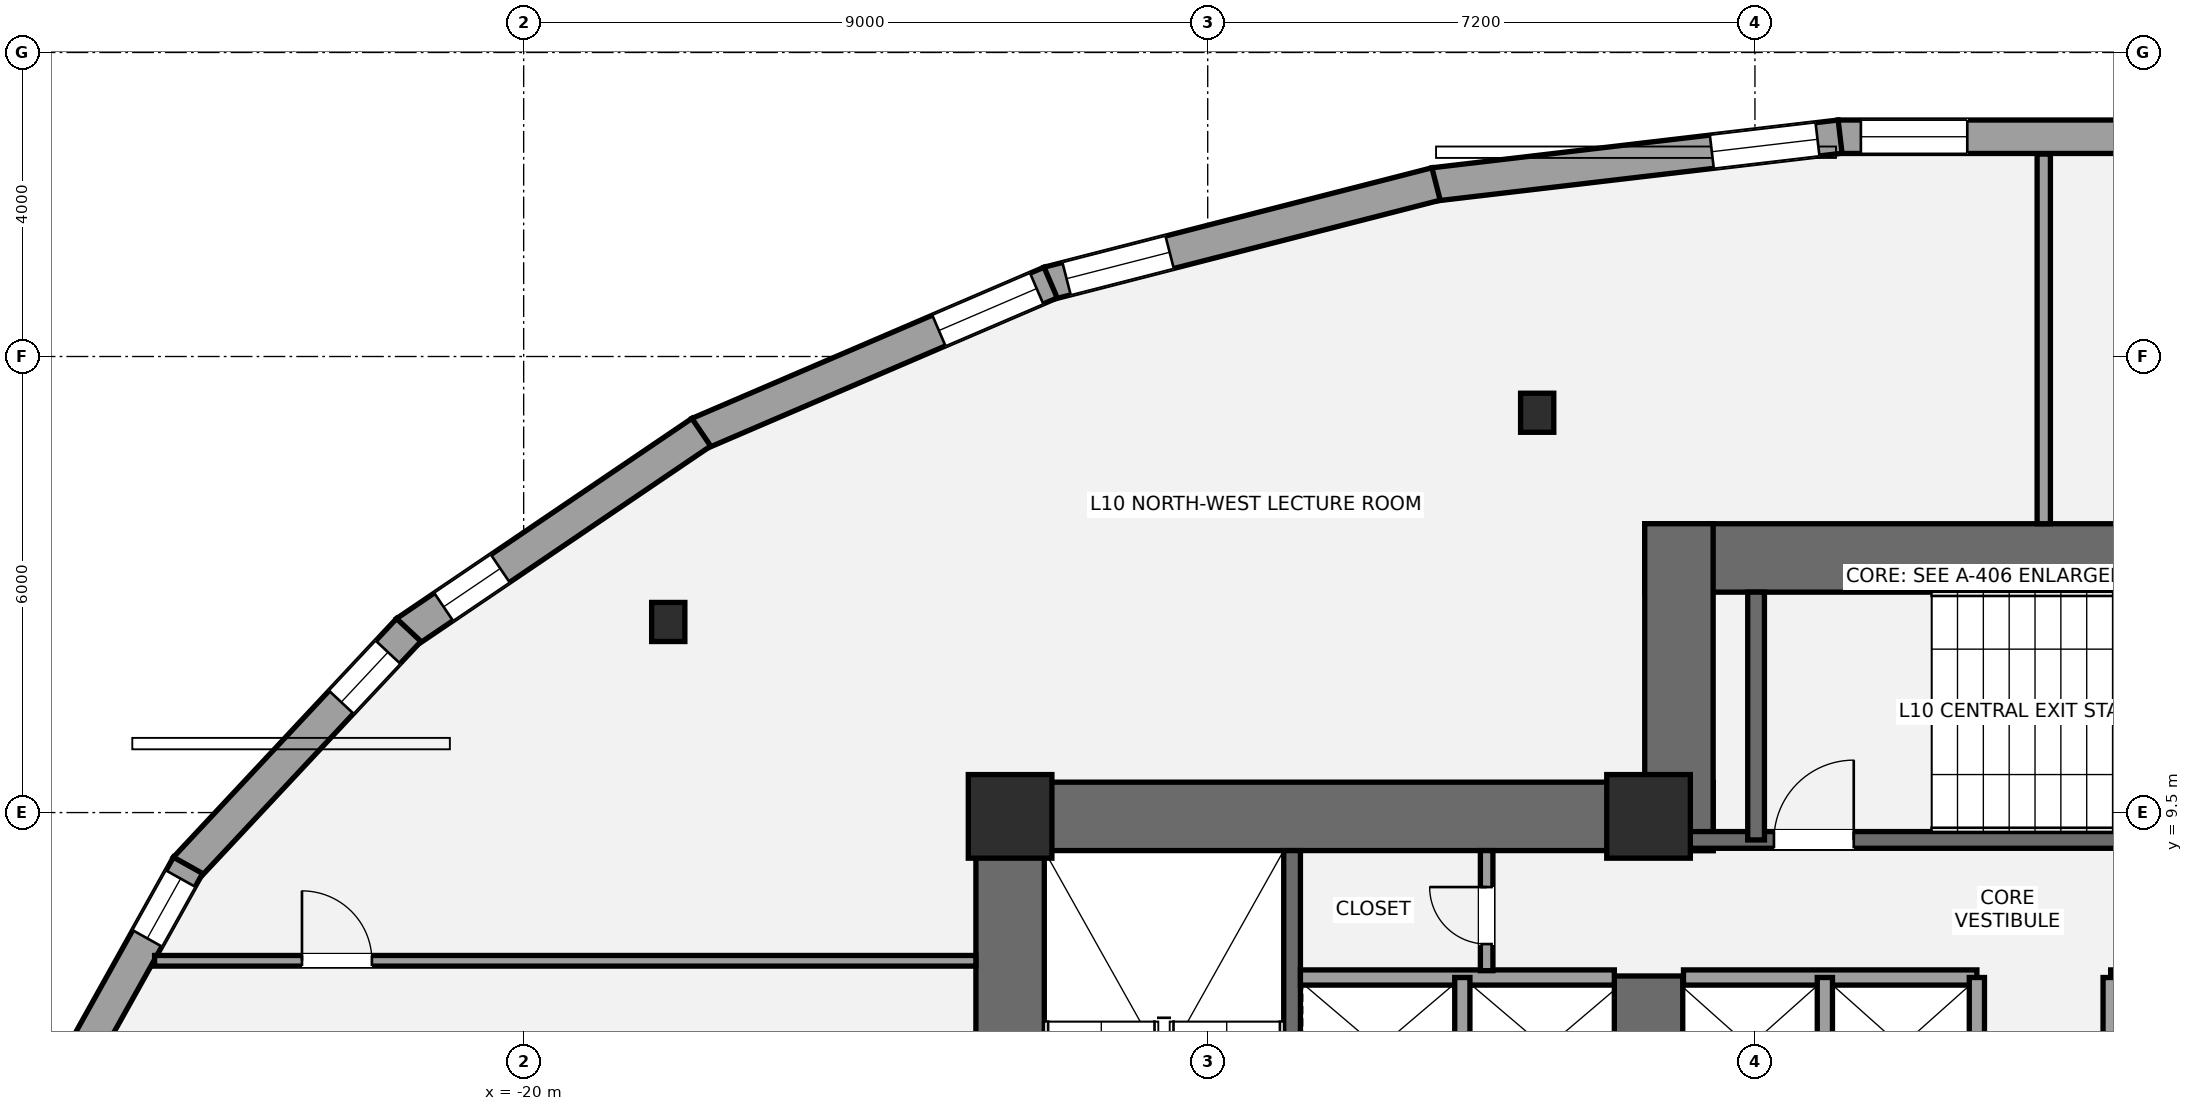
"""IFC4 building model, lengths in metres.
Left out: names, types, materials, properties, quantities, classifications, styles, units other than length and angle.
Written with IfcOpenShell. Run it as: python <this file> out.ifc"""

import sys

from ifc_helpers import new_model, si_unit, direction, frame, frame_2d, origin, origin_2d, place, context, subcontext, project, spatial, rectangle, i_section, extrude, element, fill, save


model = new_model("IFC4")
c1 = context("Model", 3, precision=1e-05, world=origin(), true_north=direction((0.0, 1.0)))
c2 = subcontext(c1, "Body", "Model", "MODEL_VIEW")
j1 = project(units=[si_unit("LENGTHUNIT", "METRE"), si_unit("PLANEANGLEUNIT", "RADIAN")], contexts=[c1])
p1 = place(None, origin())
s1 = spatial("IfcSite", under=j1, at=p1, CompositionType="ELEMENT")
p2 = place(p1, origin())
s2 = spatial("IfcBuilding", under=s1, at=p2, CompositionType="ELEMENT")
p3 = place(p2, frame((0.0, 0.0, 41.4)))
s3 = spatial("IfcBuildingStorey", under=s2, at=p3, CompositionType="ELEMENT", Elevation=41.4)
p4 = place(p3, frame((-13.6, 0.95, 0.0), z_axis=(0.0, 0.0, 1.0), x_axis=(0.0, 1.0, 0.0)))
e1 = element("IfcWall", 1, at=p4, inside=s3, PredefinedType="SHEAR", context=c2, shape_type="SweptSolid", body=[
    extrude(rectangle(XDim=8.95, YDim=0.9, at=frame_2d((4.475, 0.0))), origin(), (0.0, 0.0, 1.0), 3.6),
])
p5 = place(p3, frame((-14.05, 9.45, 0.0), z_axis=(0.0, 0.0, 1.0), x_axis=(1.0, 0.0, 0.0)))
e2 = element("IfcWall", 2, at=p5, inside=s3, PredefinedType="SHEAR", context=c2, shape_type="SweptSolid", body=[
    extrude(rectangle(XDim=9.7, YDim=0.9, at=frame_2d((4.85, 0.0))), origin(), (0.0, 0.0, 1.0), 3.6),
])
p6 = place(p3, frame((-5.2, 5.35, 0.0), z_axis=(0.0, 0.0, 1.0), x_axis=(0.0, 1.0, 0.0)))
e3 = element("IfcWall", 3, at=p6, inside=s3, PredefinedType="SHEAR", context=c2, shape_type="SweptSolid", body=[
    extrude(rectangle(XDim=2.0, YDim=0.9, at=frame_2d((1.0, 0.0))), origin(), (0.0, 0.0, 1.0), 3.6),
])
p7 = place(p3, frame((-9.89, 1.85, 0.0), z_axis=(0.0, 0.0, 1.0), x_axis=(0.0, 1.0, 0.0)))
e4 = element("IfcWall", 4, at=p7, inside=s3, PredefinedType="SHEAR", context=c2, shape_type="SweptSolid", body=[
    extrude(rectangle(XDim=7.15, YDim=0.22, at=frame_2d((3.575, 0.0))), origin(), (0.0, 0.0, 1.0), 3.6),
])
p8 = place(p3, frame((-5.25, 12.85, 0.0), z_axis=(0.0, 0.0, 1.0), x_axis=(1.0, 0.0, 0.0)))
e5 = element("IfcWall", 5, at=p8, inside=s3, PredefinedType="SHEAR", context=c2, shape_type="SweptSolid", body=[
    extrude(rectangle(XDim=10.5, YDim=0.9, at=frame_2d((5.25, 0.0))), origin(), (0.0, 0.0, 1.0), 3.6),
])
p9 = place(p3, frame((-4.8, 9.0, 0.0), z_axis=(0.0, 0.0, 1.0), x_axis=(0.0, 1.0, 0.0)))
e6 = element("IfcWall", 6, at=p9, inside=s3, PredefinedType="SHEAR", context=c2, shape_type="SweptSolid", body=[
    extrude(rectangle(XDim=4.3, YDim=0.9, at=frame_2d((2.15, 0.0))), origin(), (0.0, 0.0, 1.0), 3.6),
])
p10 = place(p3, frame((-4.7, 9.14, 0.0), z_axis=(0.0, 0.0, 1.0), x_axis=(1.0, 0.0, 0.0)))
e7 = element("IfcWall", 7, at=p10, inside=s3, PredefinedType="SHEAR", context=c2, shape_type="SweptSolid", body=[
    extrude(rectangle(XDim=9.3, YDim=0.22, at=frame_2d((4.65, 0.0))), origin(), (0.0, 0.0, 1.0), 3.6),
])
p11 = place(p10, frame((1.15, 0.0, 0.0)))
e8 = element("IfcOpeningElement", 8, at=p11, cuts=e7, PredefinedType="OPENING", context=c2, shape_type="SweptSolid", body=[
    extrude(rectangle(XDim=1.05, YDim=2.15, at=frame_2d((0.525, 1.075))), frame((0.0, 0.12, 0.0), z_axis=(0.0, -1.0, 0.0), x_axis=(1.0, 0.0, 0.0)), (0.0, 0.0, 1.0), 0.24),
])
p12 = place(p3, frame((-3.785, 9.14, 0.0), z_axis=(0.0, 0.0, 1.0), x_axis=(0.0, 1.0, 0.0)))
e9 = element("IfcWall", 9, at=p12, inside=s3, PredefinedType="SHEAR", context=c2, shape_type="SweptSolid", body=[
    extrude(rectangle(XDim=3.26, YDim=0.22, at=frame_2d((1.63, 0.0))), origin(), (0.0, 0.0, 1.0), 3.6),
])
for number, where, z_axis, x_axis in (
    (10, (-13.6, 9.45, 0.0), (0.0, 0.0, 1.0), (1.0, 0.0, 0.0)),
    (11, (-5.2, 9.45, 0.0), (0.0, 0.0, 1.0), (1.0, 0.0, 0.0)),
):
    element("IfcColumn", number, at=place(p3, frame(where, z_axis=z_axis, x_axis=x_axis)), inside=s3, PredefinedType="COLUMN", context=c2, shape_type="SweptSolid", body=[
        extrude(rectangle(XDim=1.1, YDim=1.1, at=origin_2d()), origin(), (0.0, 0.0, 1.0), 3.6),
    ])
for number, where, z_axis, x_axis in (
    (12, (-6.665, 14.76, 0.0), (0.0, 0.0, 1.0), (1.0, 0.0, 0.0)),
    (13, (-18.098, 12.007, 0.0), (0.0, 0.0, 1.0), (1.0, 0.0, 0.0)),
):
    element("IfcColumn", number, at=place(p3, frame(where, z_axis=z_axis, x_axis=x_axis)), inside=s3, PredefinedType="COLUMN", context=c2, shape_type="SweptSolid", body=[
        extrude(i_section(OverallWidth=0.437, OverallDepth=0.514, WebThickness=0.061, FlangeThickness=0.097, at=origin_2d()), origin(), (0.0, 0.0, 1.0), 3.6),
    ])
p13 = place(p3, frame((-2.705, 18.391, 0.0), z_axis=(0.0, 0.0, 1.0), x_axis=(1.0, 0.0, 0.0)))
e14 = element("IfcWall", 14, at=p13, inside=s3, PredefinedType="STANDARD", context=c2, shape_type="SweptSolid", body=[
    extrude(rectangle(XDim=5.41, YDim=0.44, at=frame_2d((2.705, 0.0))), origin(), (0.0, 0.0, 1.0), 2.529),
])
p14 = place(p13, frame((0.299, 0.0, 0.58)))
e15 = element("IfcOpeningElement", 15, at=p14, cuts=e14, PredefinedType="OPENING", context=c2, shape_type="SweptSolid", body=[
    extrude(rectangle(XDim=1.4, YDim=1.55, at=frame_2d((0.7, 0.775))), frame((0.0, 0.23, 0.0), z_axis=(0.0, -1.0, 0.0), x_axis=(1.0, 0.0, 0.0)), (0.0, 0.0, 1.0), 0.46),
])
p15 = place(p3, frame((-8.025, 17.764, 0.0), z_axis=(0.0, 0.0, 1.0), x_axis=(0.993159890371, 0.116762289112, 0.0)))
e16 = element("IfcWall", 16, at=p15, inside=s3, PredefinedType="STANDARD", context=c2, shape_type="SweptSolid", body=[
    extrude(rectangle(XDim=5.382, YDim=0.44, at=frame_2d((2.691, 0.0))), origin(), (0.0, 0.0, 1.0), 2.529),
])
p16 = place(p15, frame((3.682, 0.0, 0.58)))
e17 = element("IfcOpeningElement", 17, at=p16, cuts=e16, PredefinedType="OPENING", context=c2, shape_type="SweptSolid", body=[
    extrude(rectangle(XDim=1.4, YDim=1.55, at=frame_2d((0.7, 0.775))), frame((0.0, 0.23, 0.0), z_axis=(0.0, -1.0, 0.0), x_axis=(1.0, 0.0, 0.0)), (0.0, 0.0, 1.0), 0.46),
])
p17 = place(p3, frame((-13.099, 16.462, 0.0), z_axis=(0.0, 0.0, 1.0), x_axis=(0.968705592422, 0.248212560542, 0.0)))
e18 = element("IfcWall", 18, at=p17, inside=s3, PredefinedType="STANDARD", context=c2, shape_type="SweptSolid", body=[
    extrude(rectangle(XDim=5.268, YDim=0.44, at=frame_2d((2.634, 0.0))), origin(), (0.0, 0.0, 1.0), 2.529),
])
p18 = place(p17, frame((0.25, 0.0, 0.58)))
e19 = element("IfcOpeningElement", 19, at=p18, cuts=e18, PredefinedType="OPENING", context=c2, shape_type="SweptSolid", body=[
    extrude(rectangle(XDim=1.4, YDim=1.55, at=frame_2d((0.7, 0.775))), frame((0.0, 0.23, 0.0), z_axis=(0.0, -1.0, 0.0), x_axis=(1.0, 0.0, 0.0)), (0.0, 0.0, 1.0), 0.46),
])
p19 = place(p3, frame((-17.7, 14.483, 0.0), z_axis=(0.0, 0.0, 1.0), x_axis=(0.918881850071, 0.394532819433, 0.0)))
e20 = element("IfcWall", 20, at=p19, inside=s3, PredefinedType="STANDARD", context=c2, shape_type="SweptSolid", body=[
    extrude(rectangle(XDim=5.042, YDim=0.44, at=frame_2d((2.521, 0.0))), origin(), (0.0, 0.0, 1.0), 2.529),
])
p20 = place(p19, frame((3.442, 0.0, 0.45)))
e21 = element("IfcOpeningElement", 21, at=p20, cuts=e20, PredefinedType="OPENING", context=c2, shape_type="SweptSolid", body=[
    extrude(rectangle(XDim=1.4, YDim=1.55, at=frame_2d((0.7, 0.775))), frame((0.0, 0.23, 0.0), z_axis=(0.0, -1.0, 0.0), x_axis=(1.0, 0.0, 0.0)), (0.0, 0.0, 1.0), 0.46),
])
p21 = place(p3, frame((-21.549, 11.87, 0.0), z_axis=(0.0, 0.0, 1.0), x_axis=(0.827825981515, 0.560984976919, 0.0)))
e22 = element("IfcWall", 22, at=p21, inside=s3, PredefinedType="STANDARD", context=c2, shape_type="SweptSolid", body=[
    extrude(rectangle(XDim=4.695, YDim=0.44, at=frame_2d((2.347, 0.0))), origin(), (0.0, 0.0, 1.0), 2.529),
])
p22 = place(p21, frame((0.599, 0.0, 0.58)))
e23 = element("IfcOpeningElement", 23, at=p22, cuts=e22, PredefinedType="OPENING", context=c2, shape_type="SweptSolid", body=[
    extrude(rectangle(XDim=0.9, YDim=1.35, at=frame_2d((0.45, 0.675))), frame((0.0, 0.23, 0.0), z_axis=(0.0, -1.0, 0.0), x_axis=(1.0, 0.0, 0.0)), (0.0, 0.0, 1.0), 0.46),
])
p23 = place(p3, frame((-24.448, 8.763, 0.0), z_axis=(0.0, 0.0, 1.0), x_axis=(0.68299392258, 0.730424056093, 0.0)))
e24 = element("IfcWall", 24, at=p23, inside=s3, PredefinedType="STANDARD", context=c2, shape_type="SweptSolid", body=[
    extrude(rectangle(XDim=4.298, YDim=0.44, at=frame_2d((2.149, 0.0))), origin(), (0.0, 0.0, 1.0), 2.529),
])
p24 = place(p23, frame((2.998, 0.0, 0.58)))
e25 = element("IfcOpeningElement", 25, at=p24, cuts=e24, PredefinedType="OPENING", context=c2, shape_type="SweptSolid", body=[
    extrude(rectangle(XDim=0.9, YDim=1.35, at=frame_2d((0.45, 0.675))), frame((0.0, 0.23, 0.0), z_axis=(0.0, -1.0, 0.0), x_axis=(1.0, 0.0, 0.0)), (0.0, 0.0, 1.0), 0.46),
])
p25 = place(p3, frame((-26.346, 5.348, 0.0), z_axis=(0.0, 0.0, 1.0), x_axis=(0.487369438963, 0.873195871477, 0.0)))
e26 = element("IfcWall", 26, at=p25, inside=s3, PredefinedType="STANDARD", context=c2, shape_type="SweptSolid", body=[
    extrude(rectangle(XDim=3.96, YDim=0.44, at=frame_2d((1.98, 0.0))), origin(), (0.0, 0.0, 1.0), 2.529),
])
p26 = place(p25, frame((2.86, 0.0, 0.92)))
e27 = element("IfcOpeningElement", 27, at=p26, cuts=e26, PredefinedType="OPENING", context=c2, shape_type="SweptSolid", body=[
    extrude(rectangle(XDim=0.9, YDim=1.35, at=frame_2d((0.45, 0.675))), frame((0.0, 0.23, 0.0), z_axis=(0.0, -1.0, 0.0), x_axis=(1.0, 0.0, 0.0)), (0.0, 0.0, 1.0), 0.46),
])
p27 = place(p3, frame((-9.78, 7.33, 0.0), z_axis=(0.0, 0.0, 1.0), x_axis=(1.0, 0.0, 0.0)))
e28 = element("IfcWall", 28, at=p27, inside=s3, PredefinedType="SOLIDWALL", context=c2, shape_type="SweptSolid", body=[
    extrude(rectangle(XDim=4.13, YDim=0.2, at=frame_2d((2.065, 0.0))), origin(), (0.0, 0.0, 1.0), 3.4),
])
p28 = place(p3, frame((-7.65, 5.47, 0.0), z_axis=(0.0, 0.0, 1.0), x_axis=(0.0, 1.0, 0.0)))
e29 = element("IfcWall", 29, at=p28, inside=s3, PredefinedType="SOLIDWALL", context=c2, shape_type="SweptSolid", body=[
    extrude(rectangle(XDim=1.86, YDim=0.2, at=frame_2d((0.93, 0.0))), origin(), (0.0, 0.0, 1.0), 3.4),
])
for number, where, z_axis, x_axis in (
    (30, (-4.74, 7.33, 0.0), (0.0, 0.0, 1.0), (1.0, 0.0, 0.0)),
    (31, (0.88, 7.33, 0.0), (0.0, 0.0, 1.0), (1.0, 0.0, 0.0)),
):
    element("IfcWall", number, at=place(p3, frame(where, z_axis=z_axis, x_axis=x_axis)), inside=s3, PredefinedType="SOLIDWALL", context=c2, shape_type="SweptSolid", body=[
        extrude(rectangle(XDim=3.86, YDim=0.2, at=frame_2d((1.93, 0.0))), origin(), (0.0, 0.0, 1.0), 3.4),
    ])
for number, where, z_axis, x_axis in (
    (32, (-2.88, 5.52, 0.0), (0.0, 0.0, 1.0), (0.0, 1.0, 0.0)),
    (33, (-0.88, 5.52, 0.0), (0.0, 0.0, 1.0), (0.0, 1.0, 0.0)),
    (34, (0.88, 5.52, 0.0), (0.0, 0.0, 1.0), (0.0, 1.0, 0.0)),
):
    element("IfcWall", number, at=place(p3, frame(where, z_axis=z_axis, x_axis=x_axis)), inside=s3, PredefinedType="SOLIDWALL", context=c2, shape_type="SweptSolid", body=[
        extrude(rectangle(XDim=1.81, YDim=0.2, at=frame_2d((0.905, 0.0))), origin(), (0.0, 0.0, 1.0), 3.4),
    ])
p29 = place(p3, frame((-7.33, 7.42, 0.0), z_axis=(0.0, 0.0, 1.0), x_axis=(0.0, 1.0, 0.0)))
e35 = element("IfcWall", 35, at=p29, inside=s3, PredefinedType="PARTITIONING", context=c2, shape_type="SweptSolid", body=[
    extrude(rectangle(XDim=1.58, YDim=0.165, at=frame_2d((0.79, 0.0))), origin(), (0.0, 0.0, 1.0), 3.4),
])
p30 = place(p29, frame((0.35, 0.0, 0.0)))
e36 = element("IfcOpeningElement", 36, at=p30, cuts=e35, PredefinedType="OPENING", context=c2, shape_type="SweptSolid", body=[
    extrude(rectangle(XDim=0.75, YDim=2.1, at=frame_2d((0.375, 1.05))), frame((0.0, 0.093, 0.0), z_axis=(0.0, -1.0, 0.0), x_axis=(1.0, 0.0, 0.0)), (0.0, 0.0, 1.0), 0.185),
])
p31 = place(p3, frame((-24.856, 7.55, 0.0), z_axis=(0.0, 0.0, 1.0), x_axis=(1.0, 0.0, 0.0)))
e37 = element("IfcWall", 37, at=p31, inside=s3, PredefinedType="PARTITIONING", context=c2, shape_type="SweptSolid", body=[
    extrude(rectangle(XDim=10.806, YDim=0.14, at=frame_2d((5.403, 0.0))), origin(), (0.0, 0.0, 1.0), 2.853),
])
p32 = place(p31, frame((1.939, 0.0, 0.0)))
e38 = element("IfcOpeningElement", 38, at=p32, cuts=e37, PredefinedType="OPENING", context=c2, shape_type="SweptSolid", body=[
    extrude(rectangle(XDim=0.92, YDim=2.15, at=frame_2d((0.46, 1.075))), frame((0.0, 0.08, 0.0), z_axis=(0.0, -1.0, 0.0), x_axis=(1.0, 0.0, 0.0)), (0.0, 0.0, 1.0), 0.16),
])
p33 = place(p3, frame((0.0, 13.3, 0.0), z_axis=(0.0, 0.0, 1.0), x_axis=(0.0, 1.0, 0.0)))
e39 = element("IfcWall", 39, at=p33, inside=s3, PredefinedType="PARTITIONING", context=c2, shape_type="SweptSolid", body=[
    extrude(rectangle(XDim=4.863, YDim=0.175, at=frame_2d((2.432, 0.0))), origin(), (0.0, 0.0, 1.0), 3.4),
])
p34 = place(p14, origin())
e40 = element("IfcWindow", 40, at=p34, inside=s3, PartitioningType="SINGLE_PANEL", PredefinedType="WINDOW", context=c2, shape_type="SweptSolid", body=[
    extrude(rectangle(XDim=1.4, YDim=1.55, at=frame_2d((0.7, 0.775))), frame((0.0, -0.01, 0.0), z_axis=(0.0, -1.0, 0.0), x_axis=(1.0, 0.0, 0.0)), (0.0, 0.0, 1.0), 0.06),
])
fill(e15, e40)
p35 = place(p16, origin())
e41 = element("IfcWindow", 41, at=p35, inside=s3, PartitioningType="SINGLE_PANEL", PredefinedType="WINDOW", context=c2, shape_type="SweptSolid", body=[
    extrude(rectangle(XDim=1.4, YDim=1.55, at=frame_2d((0.7, 0.775))), frame((0.0, -0.01, 0.0), z_axis=(0.0, -1.0, 0.0), x_axis=(1.0, 0.0, 0.0)), (0.0, 0.0, 1.0), 0.06),
])
fill(e17, e41)
p36 = place(p18, origin())
e42 = element("IfcWindow", 42, at=p36, inside=s3, PartitioningType="SINGLE_PANEL", PredefinedType="WINDOW", context=c2, shape_type="SweptSolid", body=[
    extrude(rectangle(XDim=1.4, YDim=1.55, at=frame_2d((0.7, 0.775))), frame((0.0, -0.01, 0.0), z_axis=(0.0, -1.0, 0.0), x_axis=(1.0, 0.0, 0.0)), (0.0, 0.0, 1.0), 0.06),
])
fill(e19, e42)
p37 = place(p20, origin())
e43 = element("IfcWindow", 43, at=p37, inside=s3, PartitioningType="SINGLE_PANEL", PredefinedType="WINDOW", context=c2, shape_type="SweptSolid", body=[
    extrude(rectangle(XDim=1.4, YDim=1.55, at=frame_2d((0.7, 0.775))), frame((0.0, -0.01, 0.0), z_axis=(0.0, -1.0, 0.0), x_axis=(1.0, 0.0, 0.0)), (0.0, 0.0, 1.0), 0.06),
])
fill(e21, e43)
p38 = place(p22, origin())
e44 = element("IfcWindow", 44, at=p38, inside=s3, PartitioningType="SINGLE_PANEL", PredefinedType="WINDOW", context=c2, shape_type="SweptSolid", body=[
    extrude(rectangle(XDim=0.9, YDim=1.35, at=frame_2d((0.45, 0.675))), frame((0.0, -0.01, 0.0), z_axis=(0.0, -1.0, 0.0), x_axis=(1.0, 0.0, 0.0)), (0.0, 0.0, 1.0), 0.06),
])
fill(e23, e44)
p39 = place(p24, origin())
e45 = element("IfcWindow", 45, at=p39, inside=s3, PartitioningType="SINGLE_PANEL", PredefinedType="WINDOW", context=c2, shape_type="SweptSolid", body=[
    extrude(rectangle(XDim=0.9, YDim=1.35, at=frame_2d((0.45, 0.675))), frame((0.0, -0.01, 0.0), z_axis=(0.0, -1.0, 0.0), x_axis=(1.0, 0.0, 0.0)), (0.0, 0.0, 1.0), 0.06),
])
fill(e25, e45)
p40 = place(p26, origin())
e46 = element("IfcWindow", 46, at=p40, inside=s3, PartitioningType="SINGLE_PANEL", PredefinedType="WINDOW", context=c2, shape_type="SweptSolid", body=[
    extrude(rectangle(XDim=0.9, YDim=1.35, at=frame_2d((0.45, 0.675))), frame((0.0, -0.01, 0.0), z_axis=(0.0, -1.0, 0.0), x_axis=(1.0, 0.0, 0.0)), (0.0, 0.0, 1.0), 0.06),
])
fill(e27, e46)
p41 = place(p11, origin())
e47 = element("IfcDoor", 47, at=p41, inside=s3, OperationType="SINGLE_SWING_RIGHT", PredefinedType="DOOR", context=c2, shape_type="SweptSolid", body=[
    extrude(rectangle(XDim=1.05, YDim=2.15, at=frame_2d((0.525, 1.075))), frame((0.0, 0.025, 0.0), z_axis=(0.0, -1.0, 0.0), x_axis=(1.0, 0.0, 0.0)), (0.0, 0.0, 1.0), 0.05),
])
fill(e8, e47)
p42 = place(p30, origin())
e48 = element("IfcDoor", 48, at=p42, inside=s3, OperationType="SINGLE_SWING_RIGHT", PredefinedType="DOOR", context=c2, shape_type="SweptSolid", body=[
    extrude(rectangle(XDim=0.75, YDim=2.1, at=frame_2d((0.375, 1.05))), frame((0.0, 0.025, 0.0), z_axis=(0.0, -1.0, 0.0), x_axis=(1.0, 0.0, 0.0)), (0.0, 0.0, 1.0), 0.05),
])
fill(e36, e48)
p43 = place(p32, origin())
e49 = element("IfcDoor", 49, at=p43, inside=s3, OperationType="SINGLE_SWING_LEFT", PredefinedType="DOOR", context=c2, shape_type="SweptSolid", body=[
    extrude(rectangle(XDim=0.92, YDim=2.15, at=frame_2d((0.46, 1.075))), frame((0.0, 0.025, 0.0), z_axis=(0.0, -1.0, 0.0), x_axis=(1.0, 0.0, 0.0)), (0.0, 0.0, 1.0), 0.05),
])
fill(e38, e49)
save(model, sys.argv[1])
